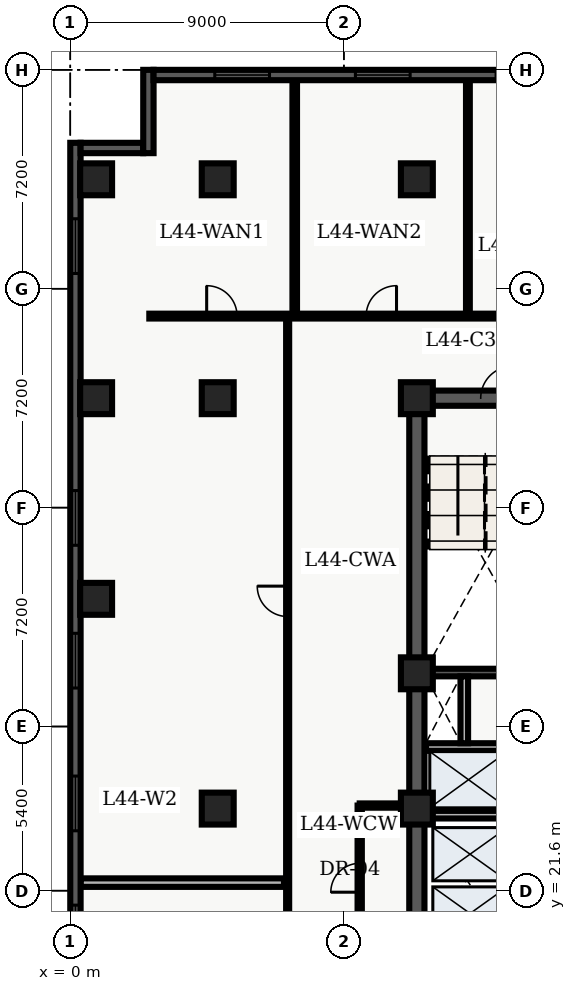
"""IFC4 building model, lengths in metres.
Left out: names, types, materials, properties, quantities, classifications, styles, units other than length and angle.
Written with IfcOpenShell. Run it as: python <this file> out.ifc"""

import sys

from ifc_helpers import new_model, entity, si_unit, converted_unit, direction, frame, origin_with_axes, origin_2d_with_axis, place, context, subcontext, project, spatial, polyline, rectangle, outline, extrude, element, fill, save


model = new_model("IFC4")
c1 = context("Model", 3, precision=1e-05, world=origin_with_axes(), true_north=direction((0.0, 1.0)))
c2 = subcontext(c1, "Body", "Model", "MODEL_VIEW")
j1 = project(units=[si_unit("LENGTHUNIT", "METRE"), converted_unit("PLANEANGLEUNIT", "DEGREE", entity("IfcPlaneAngleMeasure", 0.017), si_unit("PLANEANGLEUNIT", "RADIAN"), dimensions=[0, 0, 0, 0, 0, 0, 0])], contexts=[c1])
p1 = place(None, origin_with_axes())
s1 = spatial("IfcSite", under=j1, at=p1, CompositionType="ELEMENT")
p2 = place(p1, origin_with_axes())
s2 = spatial("IfcBuilding", under=s1, at=p2, CompositionType="ELEMENT")
p3 = place(p2, frame((0.0, 0.0, 179.7), z_axis=(0.0, 0.0, 1.0), x_axis=(1.0, 0.0, 0.0)))
s3 = spatial("IfcBuildingStorey", under=s2, at=p3, CompositionType="ELEMENT", Elevation=179.7)
p4 = place(p3, frame((11.4, 10.8, 0.0), z_axis=(0.0, 0.0, 1.0), x_axis=(0.0, 1.0, 0.0)))
e1 = element("IfcWall", 1, at=p4, inside=s3, PredefinedType="SHEAR", context=c2, shape_type="SweptSolid", body=[
    extrude(outline(polyline([(0.0, -0.25), (27.0, -0.25), (27.0, 0.25), (0.0, 0.25), (0.0, -0.25)])), origin_with_axes(), (0.0, 0.0, 1.0), 3.66),
])
p5 = place(p3, frame((11.4, 37.8, 0.0), z_axis=(0.0, 0.0, 1.0), x_axis=(1.0, 0.0, 0.0)))
e2 = element("IfcWall", 2, at=p5, inside=s3, PredefinedType="SHEAR", context=c2, shape_type="SweptSolid", body=[
    extrude(outline(polyline([(0.0, -0.25), (7.2, -0.25), (7.2, 0.25), (0.0, 0.25), (0.0, -0.25)])), origin_with_axes(), (0.0, 0.0, 1.0), 3.66),
])
p6 = place(p5, frame((2.625, 0.0, 0.0), z_axis=(0.0, 0.0, 1.0), x_axis=(1.0, 0.0, 0.0)))
e3 = element("IfcOpeningElement", 3, at=p6, cuts=e2, PredefinedType="OPENING", context=c2, shape_type="SweptSolid", body=[
    extrude(rectangle(XDim=1.05, YDim=0.52, at=origin_2d_with_axis()), origin_with_axes(), (0.0, 0.0, 1.0), 2.15),
])
p7 = place(p3, frame((11.65, 28.775, 0.0), z_axis=(0.0, 0.0, 1.0), x_axis=(1.0, 0.0, 0.0)))
e4 = element("IfcWall", 4, at=p7, inside=s3, PredefinedType="SHEAR", context=c2, shape_type="SweptSolid", body=[
    extrude(outline(polyline([(0.0, -0.125), (6.7, -0.125), (6.7, 0.125), (0.0, 0.125), (0.0, -0.125)])), origin_with_axes(), (0.0, 0.0, 1.0), 3.66),
])
p8 = place(p3, frame((11.7, 24.1, 0.0), z_axis=(0.0, 0.0, 1.0), x_axis=(1.0, 0.0, 0.0)))
e5 = element("IfcWall", 5, at=p8, inside=s3, PredefinedType="SOLIDWALL", context=c2, shape_type="SweptSolid", body=[
    extrude(outline(polyline([(0.0, -0.125), (6.6, -0.125), (6.6, 0.125), (0.0, 0.125), (0.0, -0.125)])), origin_with_axes(), (0.0, 0.0, 1.0), 2.7),
])
p9 = place(p8, frame((3.75, 0.0, 0.0), z_axis=(0.0, 0.0, 1.0), x_axis=(1.0, 0.0, 0.0)))
e6 = element("IfcOpeningElement", 6, at=p9, cuts=e5, PredefinedType="OPENING", context=c2, shape_type="SweptSolid", body=[
    extrude(rectangle(XDim=0.9, YDim=0.27, at=origin_2d_with_axis()), origin_with_axes(), (0.0, 0.0, 1.0), 2.15),
])
p10 = place(p3, frame((11.7, 26.325, 0.0), z_axis=(0.0, 0.0, 1.0), x_axis=(1.0, 0.0, 0.0)))
e7 = element("IfcWall", 7, at=p10, inside=s3, PredefinedType="SOLIDWALL", context=c2, shape_type="SweptSolid", body=[
    extrude(outline(polyline([(0.0, -0.125), (6.6, -0.125), (6.6, 0.125), (0.0, 0.125), (0.0, -0.125)])), origin_with_axes(), (0.0, 0.0, 1.0), 2.7),
])
p11 = place(p10, frame((3.5, 0.0, 0.0), z_axis=(0.0, 0.0, 1.0), x_axis=(1.0, 0.0, 0.0)))
e8 = element("IfcOpeningElement", 8, at=p11, cuts=e7, PredefinedType="OPENING", context=c2, shape_type="SweptSolid", body=[
    extrude(rectangle(XDim=0.9, YDim=0.27, at=origin_2d_with_axis()), origin_with_axes(), (0.0, 0.0, 1.0), 2.15),
])
p12 = place(p3, frame((12.96, 26.45, 0.0), z_axis=(0.0, 0.0, 1.0), x_axis=(0.0, 1.0, 0.0)))
e9 = element("IfcWall", 9, at=p12, inside=s3, PredefinedType="SOLIDWALL", context=c2, shape_type="SweptSolid", body=[
    extrude(outline(polyline([(0.0, -0.125), (2.2, -0.125), (2.2, 0.125), (0.0, 0.125), (0.0, -0.125)])), origin_with_axes(), (0.0, 0.0, 1.0), 2.7),
])
for number, where, z_axis, x_axis in (
    (10, (11.4, 24.3, 0.0), (0.0, 0.0, 1.0), (1.0, 0.0, 0.0)),
    (11, (11.4, 28.75, 0.0), (0.0, 0.0, 1.0), (1.0, 0.0, 0.0)),
    (12, (11.4, 37.8, 0.0), (0.0, 0.0, 1.0), (1.0, 0.0, 0.0)),
    (13, (11.4, 45.0, 0.0), (0.0, 0.0, 1.0), (1.0, 0.0, 0.0)),
    (14, (4.85, 24.3, 0.0), (0.0, 0.0, 1.0), (1.0, 0.0, 0.0)),
    (15, (4.85, 37.8, 0.0), (0.0, 0.0, 1.0), (1.0, 0.0, 0.0)),
    (16, (4.85, 45.0, 0.0), (0.0, 0.0, 1.0), (1.0, 0.0, 0.0)),
    (17, (0.85, 31.2, 0.0), (0.0, 0.0, 1.0), (1.0, 0.0, 0.0)),
    (18, (0.85, 37.8, 0.0), (0.0, 0.0, 1.0), (1.0, 0.0, 0.0)),
    (19, (0.85, 45.0, 0.0), (0.0, 0.0, 1.0), (1.0, 0.0, 0.0)),
):
    element("IfcColumn", number, at=place(p3, frame(where, z_axis=z_axis, x_axis=x_axis)), inside=s3, PredefinedType="COLUMN", context=c2, shape_type="SweptSolid", body=[
        extrude(rectangle(XDim=1.05, YDim=1.05, at=origin_2d_with_axis()), origin_with_axes(), (0.0, 0.0, 1.0), 3.9),
    ])
p13 = place(p3, frame((9.52, 20.4, 0.0), z_axis=(0.0, 0.0, 1.0), x_axis=(0.0, 1.0, 0.0)))
e20 = element("IfcWall", 20, at=p13, inside=s3, PredefinedType="PARTITIONING", context=c2, shape_type="SweptSolid", body=[
    extrude(outline(polyline([(0.0, -0.07), (4.0, -0.07), (4.0, 0.07), (0.0, 0.07), (0.0, -0.07)])), origin_with_axes(), (0.0, 0.0, 1.0), 2.7),
])
p14 = place(p13, frame((1.625, 0.0, 0.0), z_axis=(0.0, 0.0, 1.0), x_axis=(1.0, 0.0, 0.0)))
e21 = element("IfcOpeningElement", 21, at=p14, cuts=e20, PredefinedType="OPENING", context=c2, shape_type="SweptSolid", body=[
    extrude(rectangle(XDim=0.95, YDim=0.16, at=origin_2d_with_axis()), origin_with_axes(), (0.0, 0.0, 1.0), 2.15),
])
p15 = place(p3, frame((9.52, 24.4, 0.0), z_axis=(0.0, 0.0, 1.0), x_axis=(1.0, 0.0, 0.0)))
e22 = element("IfcWall", 22, at=p15, inside=s3, PredefinedType="PARTITIONING", context=c2, shape_type="SweptSolid", body=[
    extrude(outline(polyline([(0.0, -0.07), (1.58, -0.07), (1.58, 0.07), (0.0, 0.07), (0.0, -0.07)])), origin_with_axes(), (0.0, 0.0, 1.0), 2.7),
])
p16 = place(p3, frame((2.6, 40.5, 0.0), z_axis=(0.0, 0.0, 1.0), x_axis=(1.0, 0.0, 0.0)))
e23 = element("IfcWall", 23, at=p16, inside=s3, PredefinedType="PARTITIONING", context=c2, shape_type="SweptSolid", body=[
    extrude(outline(polyline([(0.0, -0.08), (22.87, -0.08), (22.87, 0.08), (0.0, 0.08), (0.0, -0.08)])), origin_with_axes(), (0.0, 0.0, 1.0), 2.7),
])
p17 = place(p16, frame((2.386, 0.0, 0.0), z_axis=(0.0, 0.0, 1.0), x_axis=(1.0, 0.0, 0.0)))
e24 = element("IfcOpeningElement", 24, at=p17, cuts=e23, PredefinedType="OPENING", context=c2, shape_type="SweptSolid", body=[
    extrude(rectangle(XDim=1.0, YDim=0.18, at=origin_2d_with_axis()), origin_with_axes(), (0.0, 0.0, 1.0), 2.15),
])
p18 = place(p16, frame((7.631, 0.0, 0.0), z_axis=(0.0, 0.0, 1.0), x_axis=(1.0, 0.0, 0.0)))
e25 = element("IfcOpeningElement", 25, at=p18, cuts=e23, PredefinedType="OPENING", context=c2, shape_type="SweptSolid", body=[
    extrude(rectangle(XDim=1.0, YDim=0.18, at=origin_2d_with_axis()), origin_with_axes(), (0.0, 0.0, 1.0), 2.15),
])
p19 = place(p16, frame((13.999, 0.0, 0.0), z_axis=(0.0, 0.0, 1.0), x_axis=(1.0, 0.0, 0.0)))
e26 = element("IfcOpeningElement", 26, at=p19, cuts=e23, PredefinedType="OPENING", context=c2, shape_type="SweptSolid", body=[
    extrude(rectangle(XDim=1.2, YDim=0.18, at=origin_2d_with_axis()), origin_with_axes(), (0.0, 0.0, 1.0), 2.2),
])
p20 = place(p3, frame((7.15, 7.8, 0.0), z_axis=(0.0, 0.0, 1.0), x_axis=(0.0, 1.0, 0.0)))
e27 = element("IfcWall", 27, at=p20, inside=s3, PredefinedType="PARTITIONING", context=c2, shape_type="SweptSolid", body=[
    extrude(outline(polyline([(0.0, -0.05), (32.7, -0.05), (32.7, 0.05), (0.0, 0.05), (0.0, -0.05)])), origin_with_axes(), (0.0, 0.0, 1.0), 2.7),
])
p21 = place(p20, frame((7.098, 0.0, 0.0), z_axis=(0.0, 0.0, 1.0), x_axis=(1.0, 0.0, 0.0)))
e28 = element("IfcOpeningElement", 28, at=p21, cuts=e27, PredefinedType="OPENING", context=c2, shape_type="SweptSolid", body=[
    extrude(rectangle(XDim=1.0, YDim=0.12, at=origin_2d_with_axis()), origin_with_axes(), (0.0, 0.0, 1.0), 2.15),
])
p22 = place(p20, frame((23.317, 0.0, 0.0), z_axis=(0.0, 0.0, 1.0), x_axis=(1.0, 0.0, 0.0)))
e29 = element("IfcOpeningElement", 29, at=p22, cuts=e27, PredefinedType="OPENING", context=c2, shape_type="SweptSolid", body=[
    extrude(rectangle(XDim=1.0, YDim=0.12, at=origin_2d_with_axis()), origin_with_axes(), (0.0, 0.0, 1.0), 2.15),
])
p23 = place(p3, frame((0.335, 21.865, 0.0), z_axis=(0.0, 0.0, 1.0), x_axis=(1.0, 0.0, 0.0)))
e30 = element("IfcWall", 30, at=p23, inside=s3, PredefinedType="PARTITIONING", context=c2, shape_type="SweptSolid", body=[
    extrude(outline(polyline([(0.0, -0.14), (6.695, -0.14), (6.695, 0.14), (0.0, 0.14), (0.0, -0.14)])), origin_with_axes(), (0.0, 0.0, 1.0), 2.7),
])
p24 = place(p3, frame((7.383, 40.6, 0.0), z_axis=(0.0, 0.0, 1.0), x_axis=(0.0, 1.0, 0.0)))
e31 = element("IfcWall", 31, at=p24, inside=s3, PredefinedType="PARTITIONING", context=c2, shape_type="SweptSolid", body=[
    extrude(outline(polyline([(0.0, -0.075), (7.665, -0.075), (7.665, 0.075), (0.0, 0.075), (0.0, -0.075)])), origin_with_axes(), (0.0, 0.0, 1.0), 2.7),
])
p25 = place(p3, frame((13.079, 40.6, 0.0), z_axis=(0.0, 0.0, 1.0), x_axis=(0.0, 1.0, 0.0)))
e32 = element("IfcWall", 32, at=p25, inside=s3, PredefinedType="PARTITIONING", context=c2, shape_type="SweptSolid", body=[
    extrude(outline(polyline([(0.0, -0.062), (7.665, -0.062), (7.665, 0.062), (0.0, 0.062), (0.0, -0.062)])), origin_with_axes(), (0.0, 0.0, 1.0), 2.7),
])
p26 = place(p3, frame((0.17, 2.74, 0.0), z_axis=(0.0, 0.0, 1.0), x_axis=(0.0, 1.0, 0.0)))
e33 = element("IfcWall", 33, at=p26, inside=s3, PredefinedType="SOLIDWALL", context=c2, shape_type="SweptSolid", body=[
    extrude(outline(polyline([(0.0, -0.17), (43.46, -0.17), (43.46, 0.17), (0.0, 0.17), (0.0, -0.17)])), origin_with_axes(), (0.0, 0.0, 1.0), 3.66),
])
p27 = place(p26, frame((2.948, 0.0, 0.45), z_axis=(0.0, 0.0, 1.0), x_axis=(1.0, 0.0, 0.0)))
e34 = element("IfcOpeningElement", 34, at=p27, cuts=e33, PredefinedType="OPENING", context=c2, shape_type="SweptSolid", body=[
    extrude(rectangle(XDim=1.8, YDim=0.36, at=origin_2d_with_axis()), origin_with_axes(), (0.0, 0.0, 1.0), 2.1),
])
p28 = place(p26, frame((12.339, 0.0, 0.45), z_axis=(0.0, 0.0, 1.0), x_axis=(1.0, 0.0, 0.0)))
e35 = element("IfcOpeningElement", 35, at=p28, cuts=e33, PredefinedType="OPENING", context=c2, shape_type="SweptSolid", body=[
    extrude(rectangle(XDim=1.8, YDim=0.36, at=origin_2d_with_axis()), origin_with_axes(), (0.0, 0.0, 1.0), 2.1),
])
p29 = place(p26, frame((17.484, 0.0, 0.45), z_axis=(0.0, 0.0, 1.0), x_axis=(1.0, 0.0, 0.0)))
e36 = element("IfcOpeningElement", 36, at=p29, cuts=e33, PredefinedType="OPENING", context=c2, shape_type="SweptSolid", body=[
    extrude(rectangle(XDim=1.8, YDim=0.36, at=origin_2d_with_axis()), origin_with_axes(), (0.0, 0.0, 1.0), 2.1),
])
p30 = place(p26, frame((21.73, 0.0, 0.45), z_axis=(0.0, 0.0, 1.0), x_axis=(1.0, 0.0, 0.0)))
e37 = element("IfcOpeningElement", 37, at=p30, cuts=e33, PredefinedType="OPENING", context=c2, shape_type="SweptSolid", body=[
    extrude(rectangle(XDim=1.8, YDim=0.36, at=origin_2d_with_axis()), origin_with_axes(), (0.0, 0.0, 1.0), 2.1),
])
p31 = place(p26, frame((26.426, 0.0, 0.45), z_axis=(0.0, 0.0, 1.0), x_axis=(1.0, 0.0, 0.0)))
e38 = element("IfcOpeningElement", 38, at=p31, cuts=e33, PredefinedType="OPENING", context=c2, shape_type="SweptSolid", body=[
    extrude(rectangle(XDim=1.8, YDim=0.36, at=origin_2d_with_axis()), origin_with_axes(), (0.0, 0.0, 1.0), 2.1),
])
p32 = place(p26, frame((31.121, 0.0, 0.45), z_axis=(0.0, 0.0, 1.0), x_axis=(1.0, 0.0, 0.0)))
e39 = element("IfcOpeningElement", 39, at=p32, cuts=e33, PredefinedType="OPENING", context=c2, shape_type="SweptSolid", body=[
    extrude(rectangle(XDim=1.8, YDim=0.36, at=origin_2d_with_axis()), origin_with_axes(), (0.0, 0.0, 1.0), 2.1),
])
p33 = place(p26, frame((40.062, 0.0, 0.45), z_axis=(0.0, 0.0, 1.0), x_axis=(1.0, 0.0, 0.0)))
e40 = element("IfcOpeningElement", 40, at=p33, cuts=e33, PredefinedType="OPENING", context=c2, shape_type="SweptSolid", body=[
    extrude(rectangle(XDim=1.8, YDim=0.36, at=origin_2d_with_axis()), origin_with_axes(), (0.0, 0.0, 1.0), 2.1),
])
p34 = place(p3, frame((0.34, 46.03, 0.0), z_axis=(0.0, 0.0, 1.0), x_axis=(1.0, 0.0, 0.0)))
e41 = element("IfcWall", 41, at=p34, inside=s3, PredefinedType="SOLIDWALL", context=c2, shape_type="SweptSolid", body=[
    extrude(outline(polyline([(0.0, -0.17), (2.06, -0.17), (2.06, 0.17), (0.0, 0.17), (0.0, -0.17)])), origin_with_axes(), (0.0, 0.0, 1.0), 3.66),
])
p35 = place(p3, frame((2.57, 45.86, 0.0), z_axis=(0.0, 0.0, 1.0), x_axis=(0.0, 1.0, 0.0)))
e42 = element("IfcWall", 42, at=p35, inside=s3, PredefinedType="SOLIDWALL", context=c2, shape_type="SweptSolid", body=[
    extrude(outline(polyline([(0.0, -0.17), (2.74, -0.17), (2.74, 0.17), (0.0, 0.17), (0.0, -0.17)])), origin_with_axes(), (0.0, 0.0, 1.0), 3.66),
])
p36 = place(p3, frame((2.74, 48.43, 0.0), z_axis=(0.0, 0.0, 1.0), x_axis=(1.0, 0.0, 0.0)))
e43 = element("IfcWall", 43, at=p36, inside=s3, PredefinedType="SOLIDWALL", context=c2, shape_type="SweptSolid", body=[
    extrude(outline(polyline([(0.0, -0.17), (19.705, -0.17), (19.705, 0.17), (0.0, 0.17), (0.0, -0.17)])), origin_with_axes(), (0.0, 0.0, 1.0), 3.66),
])
p37 = place(p36, frame((2.913, 0.0, 0.45), z_axis=(0.0, 0.0, 1.0), x_axis=(1.0, 0.0, 0.0)))
e44 = element("IfcOpeningElement", 44, at=p37, cuts=e43, PredefinedType="OPENING", context=c2, shape_type="SweptSolid", body=[
    extrude(rectangle(XDim=1.8, YDim=0.36, at=origin_2d_with_axis()), origin_with_axes(), (0.0, 0.0, 1.0), 2.1),
])
p38 = place(p36, frame((7.539, 0.0, 0.45), z_axis=(0.0, 0.0, 1.0), x_axis=(1.0, 0.0, 0.0)))
e45 = element("IfcOpeningElement", 45, at=p38, cuts=e43, PredefinedType="OPENING", context=c2, shape_type="SweptSolid", body=[
    extrude(rectangle(XDim=1.8, YDim=0.36, at=origin_2d_with_axis()), origin_with_axes(), (0.0, 0.0, 1.0), 2.1),
])
p39 = place(p36, frame((12.166, 0.0, 0.45), z_axis=(0.0, 0.0, 1.0), x_axis=(1.0, 0.0, 0.0)))
e46 = element("IfcOpeningElement", 46, at=p39, cuts=e43, PredefinedType="OPENING", context=c2, shape_type="SweptSolid", body=[
    extrude(rectangle(XDim=1.8, YDim=0.36, at=origin_2d_with_axis()), origin_with_axes(), (0.0, 0.0, 1.0), 2.1),
])
p40 = place(p36, frame((16.792, 0.0, 0.45), z_axis=(0.0, 0.0, 1.0), x_axis=(1.0, 0.0, 0.0)))
e47 = element("IfcOpeningElement", 47, at=p40, cuts=e43, PredefinedType="OPENING", context=c2, shape_type="SweptSolid", body=[
    extrude(rectangle(XDim=1.8, YDim=0.36, at=origin_2d_with_axis()), origin_with_axes(), (0.0, 0.0, 1.0), 2.1),
])
p41 = place(p5, frame((2.625, 0.0, 0.0), z_axis=(0.0, 0.0, 1.0), x_axis=(1.0, 0.0, 0.0)))
e48 = element("IfcDoor", 48, at=p41, inside=s3, OperationType="SINGLE_SWING_RIGHT", PredefinedType="DOOR", context=c2, shape_type="SweptSolid", body=[
    extrude(rectangle(XDim=1.05, YDim=0.09, at=origin_2d_with_axis()), origin_with_axes(), (0.0, 0.0, 1.0), 2.15),
])
fill(e3, e48)
p42 = place(p13, frame((1.625, 0.0, 0.0), z_axis=(0.0, 0.0, 1.0), x_axis=(1.0, 0.0, 0.0)))
e49 = element("IfcDoor", 49, at=p42, inside=s3, OperationType="SINGLE_SWING_LEFT", PredefinedType="DOOR", context=c2, shape_type="SweptSolid", body=[
    extrude(rectangle(XDim=0.95, YDim=0.084, at=origin_2d_with_axis()), origin_with_axes(), (0.0, 0.0, 1.0), 2.15),
])
fill(e21, e49)
p43 = place(p20, frame((23.317, 0.0, 0.0), z_axis=(0.0, 0.0, 1.0), x_axis=(1.0, 0.0, 0.0)))
e50 = element("IfcDoor", 50, at=p43, inside=s3, OperationType="SINGLE_SWING_RIGHT", PredefinedType="DOOR", context=c2, shape_type="SweptSolid", body=[
    extrude(rectangle(XDim=1.0, YDim=0.06, at=origin_2d_with_axis()), origin_with_axes(), (0.0, 0.0, 1.0), 2.15),
])
fill(e29, e50)
p44 = place(p16, frame((2.386, 0.0, 0.0), z_axis=(0.0, 0.0, 1.0), x_axis=(1.0, 0.0, 0.0)))
e51 = element("IfcDoor", 51, at=p44, inside=s3, OperationType="SINGLE_SWING_LEFT", PredefinedType="DOOR", context=c2, shape_type="SweptSolid", body=[
    extrude(rectangle(XDim=1.0, YDim=0.09, at=origin_2d_with_axis()), origin_with_axes(), (0.0, 0.0, 1.0), 2.15),
])
fill(e24, e51)
p45 = place(p16, frame((7.631, 0.0, 0.0), z_axis=(0.0, 0.0, 1.0), x_axis=(1.0, 0.0, 0.0)))
e52 = element("IfcDoor", 52, at=p45, inside=s3, OperationType="SINGLE_SWING_RIGHT", PredefinedType="DOOR", context=c2, shape_type="SweptSolid", body=[
    extrude(rectangle(XDim=1.0, YDim=0.09, at=origin_2d_with_axis()), origin_with_axes(), (0.0, 0.0, 1.0), 2.15),
])
fill(e25, e52)
p46 = place(p26, frame((17.484, 0.0, 0.45), z_axis=(0.0, 0.0, 1.0), x_axis=(1.0, 0.0, 0.0)))
e53 = element("IfcWindow", 53, at=p46, inside=s3, PredefinedType="WINDOW", context=c2, shape_type="SweptSolid", body=[
    extrude(rectangle(XDim=1.8, YDim=0.09, at=origin_2d_with_axis()), origin_with_axes(), (0.0, 0.0, 1.0), 2.1),
])
fill(e36, e53)
p47 = place(p26, frame((21.73, 0.0, 0.45), z_axis=(0.0, 0.0, 1.0), x_axis=(1.0, 0.0, 0.0)))
e54 = element("IfcWindow", 54, at=p47, inside=s3, PredefinedType="WINDOW", context=c2, shape_type="SweptSolid", body=[
    extrude(rectangle(XDim=1.8, YDim=0.09, at=origin_2d_with_axis()), origin_with_axes(), (0.0, 0.0, 1.0), 2.1),
])
fill(e37, e54)
p48 = place(p26, frame((26.426, 0.0, 0.45), z_axis=(0.0, 0.0, 1.0), x_axis=(1.0, 0.0, 0.0)))
e55 = element("IfcWindow", 55, at=p48, inside=s3, PredefinedType="WINDOW", context=c2, shape_type="SweptSolid", body=[
    extrude(rectangle(XDim=1.8, YDim=0.09, at=origin_2d_with_axis()), origin_with_axes(), (0.0, 0.0, 1.0), 2.1),
])
fill(e38, e55)
p49 = place(p26, frame((31.121, 0.0, 0.45), z_axis=(0.0, 0.0, 1.0), x_axis=(1.0, 0.0, 0.0)))
e56 = element("IfcWindow", 56, at=p49, inside=s3, PredefinedType="WINDOW", context=c2, shape_type="SweptSolid", body=[
    extrude(rectangle(XDim=1.8, YDim=0.09, at=origin_2d_with_axis()), origin_with_axes(), (0.0, 0.0, 1.0), 2.1),
])
fill(e39, e56)
p50 = place(p26, frame((40.062, 0.0, 0.45), z_axis=(0.0, 0.0, 1.0), x_axis=(1.0, 0.0, 0.0)))
e57 = element("IfcWindow", 57, at=p50, inside=s3, PredefinedType="WINDOW", context=c2, shape_type="SweptSolid", body=[
    extrude(rectangle(XDim=1.8, YDim=0.09, at=origin_2d_with_axis()), origin_with_axes(), (0.0, 0.0, 1.0), 2.1),
])
fill(e40, e57)
p51 = place(p36, frame((2.913, 0.0, 0.45), z_axis=(0.0, 0.0, 1.0), x_axis=(1.0, 0.0, 0.0)))
e58 = element("IfcWindow", 58, at=p51, inside=s3, PredefinedType="WINDOW", context=c2, shape_type="SweptSolid", body=[
    extrude(rectangle(XDim=1.8, YDim=0.09, at=origin_2d_with_axis()), origin_with_axes(), (0.0, 0.0, 1.0), 2.1),
])
fill(e44, e58)
p52 = place(p36, frame((7.539, 0.0, 0.45), z_axis=(0.0, 0.0, 1.0), x_axis=(1.0, 0.0, 0.0)))
e59 = element("IfcWindow", 59, at=p52, inside=s3, PredefinedType="WINDOW", context=c2, shape_type="SweptSolid", body=[
    extrude(rectangle(XDim=1.8, YDim=0.09, at=origin_2d_with_axis()), origin_with_axes(), (0.0, 0.0, 1.0), 2.1),
])
fill(e45, e59)
save(model, sys.argv[1])
